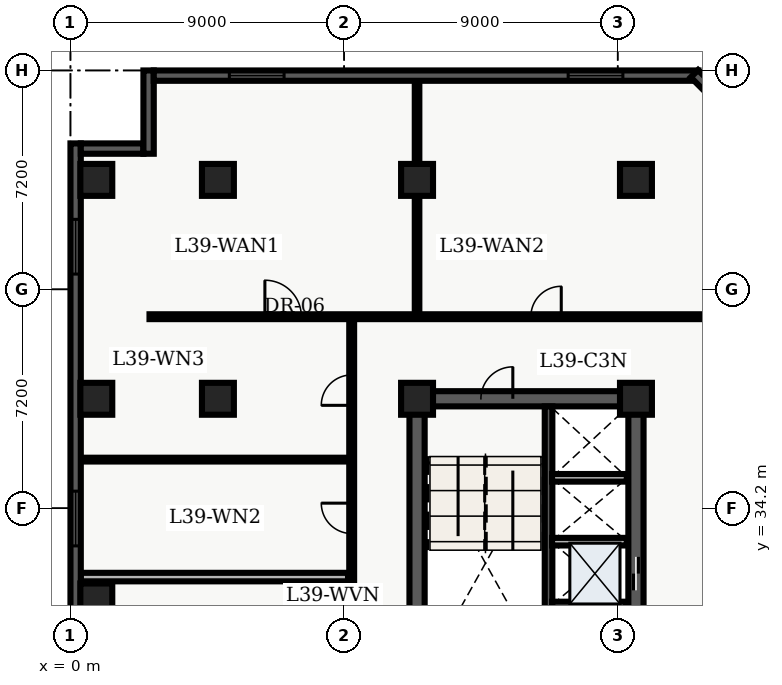
"""IFC4 building model, lengths in metres.
Left out: names, types, materials, properties, quantities, classifications, styles, units other than length and angle.
Written with IfcOpenShell. Run it as: python <this file> out.ifc"""

import sys

from ifc_helpers import new_model, entity, si_unit, converted_unit, direction, frame, origin_with_axes, origin_2d_with_axis, place, context, subcontext, project, spatial, polyline, rectangle, outline, extrude, element, fill, save


model = new_model("IFC4")
c1 = context("Model", 3, precision=1e-05, world=origin_with_axes(), true_north=direction((0.0, 1.0)))
c2 = subcontext(c1, "Body", "Model", "MODEL_VIEW")
j1 = project(units=[si_unit("LENGTHUNIT", "METRE"), converted_unit("PLANEANGLEUNIT", "DEGREE", entity("IfcPlaneAngleMeasure", 0.017), si_unit("PLANEANGLEUNIT", "RADIAN"), dimensions=[0, 0, 0, 0, 0, 0, 0])], contexts=[c1])
p1 = place(None, origin_with_axes())
s1 = spatial("IfcSite", under=j1, at=p1, CompositionType="ELEMENT")
p2 = place(p1, origin_with_axes())
s2 = spatial("IfcBuilding", under=s1, at=p2, CompositionType="ELEMENT")
p3 = place(p2, frame((0.0, 0.0, 160.2), z_axis=(0.0, 0.0, 1.0), x_axis=(1.0, 0.0, 0.0)))
s3 = spatial("IfcBuildingStorey", under=s2, at=p3, CompositionType="ELEMENT", Elevation=160.2)
p4 = place(p3, frame((11.4, 10.8, 0.0), z_axis=(0.0, 0.0, 1.0), x_axis=(0.0, 1.0, 0.0)))
e1 = element("IfcWall", 1, at=p4, inside=s3, PredefinedType="SHEAR", context=c2, shape_type="SweptSolid", body=[
    extrude(outline(polyline([(0.0, -0.25), (27.0, -0.25), (27.0, 0.25), (0.0, 0.25), (0.0, -0.25)])), origin_with_axes(), (0.0, 0.0, 1.0), 3.66),
])
p5 = place(p3, frame((11.4, 37.8, 0.0), z_axis=(0.0, 0.0, 1.0), x_axis=(1.0, 0.0, 0.0)))
e2 = element("IfcWall", 2, at=p5, inside=s3, PredefinedType="SHEAR", context=c2, shape_type="SweptSolid", body=[
    extrude(outline(polyline([(0.0, -0.25), (7.2, -0.25), (7.2, 0.25), (0.0, 0.25), (0.0, -0.25)])), origin_with_axes(), (0.0, 0.0, 1.0), 3.66),
])
p6 = place(p5, frame((2.625, 0.0, 0.0), z_axis=(0.0, 0.0, 1.0), x_axis=(1.0, 0.0, 0.0)))
e3 = element("IfcOpeningElement", 3, at=p6, cuts=e2, PredefinedType="OPENING", context=c2, shape_type="SweptSolid", body=[
    extrude(rectangle(XDim=1.05, YDim=0.52, at=origin_2d_with_axis()), origin_with_axes(), (0.0, 0.0, 1.0), 2.15),
])
p7 = place(p3, frame((18.6, 24.3, 0.0), z_axis=(0.0, 0.0, 1.0), x_axis=(0.0, 1.0, 0.0)))
e4 = element("IfcWall", 4, at=p7, inside=s3, PredefinedType="SHEAR", context=c2, shape_type="SweptSolid", body=[
    extrude(outline(polyline([(0.0, -0.25), (13.5, -0.25), (13.5, 0.25), (0.0, 0.25), (0.0, -0.25)])), origin_with_axes(), (0.0, 0.0, 1.0), 3.66),
])
p8 = place(p7, frame((5.65, 0.0, 0.0), z_axis=(0.0, 0.0, 1.0), x_axis=(1.0, 0.0, 0.0)))
e5 = element("IfcOpeningElement", 5, at=p8, cuts=e4, PredefinedType="OPENING", context=c2, shape_type="SweptSolid", body=[
    extrude(rectangle(XDim=1.1, YDim=0.52, at=origin_2d_with_axis()), origin_with_axes(), (0.0, 0.0, 1.0), 2.15),
])
p9 = place(p7, frame((7.75, 0.0, 0.0), z_axis=(0.0, 0.0, 1.0), x_axis=(1.0, 0.0, 0.0)))
e6 = element("IfcOpeningElement", 6, at=p9, cuts=e4, PredefinedType="OPENING", context=c2, shape_type="SweptSolid", body=[
    extrude(rectangle(XDim=1.1, YDim=0.52, at=origin_2d_with_axis()), origin_with_axes(), (0.0, 0.0, 1.0), 2.15),
])
p10 = place(p3, frame((15.725, 28.9, 0.0), z_axis=(0.0, 0.0, 1.0), x_axis=(0.0, 1.0, 0.0)))
e7 = element("IfcWall", 7, at=p10, inside=s3, PredefinedType="SHEAR", context=c2, shape_type="SweptSolid", body=[
    extrude(outline(polyline([(0.0, -0.125), (8.65, -0.125), (8.65, 0.125), (0.0, 0.125), (0.0, -0.125)])), origin_with_axes(), (0.0, 0.0, 1.0), 3.66),
])
for number, where, z_axis, x_axis in (
    (8, (11.4, 37.8, 0.0), (0.0, 0.0, 1.0), (1.0, 0.0, 0.0)),
    (9, (11.4, 45.0, 0.0), (0.0, 0.0, 1.0), (1.0, 0.0, 0.0)),
    (10, (18.6, 37.8, 0.0), (0.0, 0.0, 1.0), (1.0, 0.0, 0.0)),
    (11, (18.6, 45.0, 0.0), (0.0, 0.0, 1.0), (1.0, 0.0, 0.0)),
    (12, (4.85, 37.8, 0.0), (0.0, 0.0, 1.0), (1.0, 0.0, 0.0)),
    (13, (4.85, 45.0, 0.0), (0.0, 0.0, 1.0), (1.0, 0.0, 0.0)),
    (14, (0.85, 31.2, 0.0), (0.0, 0.0, 1.0), (1.0, 0.0, 0.0)),
    (15, (0.85, 37.8, 0.0), (0.0, 0.0, 1.0), (1.0, 0.0, 0.0)),
    (16, (0.85, 45.0, 0.0), (0.0, 0.0, 1.0), (1.0, 0.0, 0.0)),
):
    element("IfcColumn", number, at=place(p3, frame(where, z_axis=z_axis, x_axis=x_axis)), inside=s3, PredefinedType="COLUMN", context=c2, shape_type="SweptSolid", body=[
        extrude(rectangle(XDim=1.05, YDim=1.05, at=origin_2d_with_axis()), origin_with_axes(), (0.0, 0.0, 1.0), 3.9),
    ])
for number, where, z_axis, x_axis in (
    (17, (15.84, 31.0, 0.0), (0.0, 0.0, 1.0), (1.0, 0.0, 0.0)),
    (18, (15.84, 33.1, 0.0), (0.0, 0.0, 1.0), (1.0, 0.0, 0.0)),
    (19, (15.84, 35.2, 0.0), (0.0, 0.0, 1.0), (1.0, 0.0, 0.0)),
):
    element("IfcWall", number, at=place(p3, frame(where, z_axis=z_axis, x_axis=x_axis)), inside=s3, PredefinedType="SOLIDWALL", context=c2, shape_type="SweptSolid", body=[
        extrude(outline(polyline([(0.0, -0.125), (2.46, -0.125), (2.46, 0.125), (0.0, 0.125), (0.0, -0.125)])), origin_with_axes(), (0.0, 0.0, 1.0), 2.7),
    ])
p11 = place(p3, frame((2.6, 40.5, 0.0), z_axis=(0.0, 0.0, 1.0), x_axis=(1.0, 0.0, 0.0)))
e20 = element("IfcWall", 20, at=p11, inside=s3, PredefinedType="PARTITIONING", context=c2, shape_type="SweptSolid", body=[
    extrude(outline(polyline([(0.0, -0.08), (20.481, -0.08), (20.481, 0.08), (0.0, 0.08), (0.0, -0.08)])), origin_with_axes(), (0.0, 0.0, 1.0), 2.7),
])
p12 = place(p11, frame((4.395, 0.0, 0.0), z_axis=(0.0, 0.0, 1.0), x_axis=(1.0, 0.0, 0.0)))
e21 = element("IfcOpeningElement", 21, at=p12, cuts=e20, PredefinedType="OPENING", context=c2, shape_type="SweptSolid", body=[
    extrude(rectangle(XDim=1.2, YDim=0.18, at=origin_2d_with_axis()), origin_with_axes(), (0.0, 0.0, 1.0), 2.2),
])
p13 = place(p11, frame((13.043, 0.0, 0.0), z_axis=(0.0, 0.0, 1.0), x_axis=(1.0, 0.0, 0.0)))
e22 = element("IfcOpeningElement", 22, at=p13, cuts=e20, PredefinedType="OPENING", context=c2, shape_type="SweptSolid", body=[
    extrude(rectangle(XDim=1.0, YDim=0.18, at=origin_2d_with_axis()), origin_with_axes(), (0.0, 0.0, 1.0), 2.15),
])
p14 = place(p3, frame((9.25, 24.4, 0.0), z_axis=(0.0, 0.0, 1.0), x_axis=(0.0, 1.0, 0.0)))
e23 = element("IfcWall", 23, at=p14, inside=s3, PredefinedType="PARTITIONING", context=c2, shape_type="SweptSolid", body=[
    extrude(outline(polyline([(0.0, -0.08), (16.1, -0.08), (16.1, 0.08), (0.0, 0.08), (0.0, -0.08)])), origin_with_axes(), (0.0, 0.0, 1.0), 2.7),
])
p15 = place(p14, frame((3.808, 0.0, 0.0), z_axis=(0.0, 0.0, 1.0), x_axis=(1.0, 0.0, 0.0)))
e24 = element("IfcOpeningElement", 24, at=p15, cuts=e23, PredefinedType="OPENING", context=c2, shape_type="SweptSolid", body=[
    extrude(rectangle(XDim=1.0, YDim=0.18, at=origin_2d_with_axis()), origin_with_axes(), (0.0, 0.0, 1.0), 2.15),
])
p16 = place(p14, frame((9.467, 0.0, 0.0), z_axis=(0.0, 0.0, 1.0), x_axis=(1.0, 0.0, 0.0)))
e25 = element("IfcOpeningElement", 25, at=p16, cuts=e23, PredefinedType="OPENING", context=c2, shape_type="SweptSolid", body=[
    extrude(rectangle(XDim=1.0, YDim=0.18, at=origin_2d_with_axis()), origin_with_axes(), (0.0, 0.0, 1.0), 2.15),
])
p17 = place(p14, frame((13.684, 0.0, 0.0), z_axis=(0.0, 0.0, 1.0), x_axis=(1.0, 0.0, 0.0)))
e26 = element("IfcOpeningElement", 26, at=p17, cuts=e23, PredefinedType="OPENING", context=c2, shape_type="SweptSolid", body=[
    extrude(rectangle(XDim=1.0, YDim=0.18, at=origin_2d_with_axis()), origin_with_axes(), (0.0, 0.0, 1.0), 2.15),
])
p18 = place(p3, frame((0.335, 31.935, 0.0), z_axis=(0.0, 0.0, 1.0), x_axis=(1.0, 0.0, 0.0)))
e27 = element("IfcWall", 27, at=p18, inside=s3, PredefinedType="PARTITIONING", context=c2, shape_type="SweptSolid", body=[
    extrude(outline(polyline([(0.0, -0.14), (8.795, -0.14), (8.795, 0.14), (0.0, 0.14), (0.0, -0.14)])), origin_with_axes(), (0.0, 0.0, 1.0), 2.7),
])
p19 = place(p3, frame((0.335, 35.799, 0.0), z_axis=(0.0, 0.0, 1.0), x_axis=(1.0, 0.0, 0.0)))
e28 = element("IfcWall", 28, at=p19, inside=s3, PredefinedType="PARTITIONING", context=c2, shape_type="SweptSolid", body=[
    extrude(outline(polyline([(0.0, -0.062), (8.795, -0.062), (8.795, 0.062), (0.0, 0.062), (0.0, -0.062)])), origin_with_axes(), (0.0, 0.0, 1.0), 2.7),
])
p20 = place(p3, frame((11.4, 40.6, 0.0), z_axis=(0.0, 0.0, 1.0), x_axis=(0.0, 1.0, 0.0)))
e29 = element("IfcWall", 29, at=p20, inside=s3, PredefinedType="PARTITIONING", context=c2, shape_type="SweptSolid", body=[
    extrude(outline(polyline([(0.0, -0.075), (7.665, -0.075), (7.665, 0.075), (0.0, 0.075), (0.0, -0.075)])), origin_with_axes(), (0.0, 0.0, 1.0), 2.7),
])
p21 = place(p3, frame((0.17, 2.74, 0.0), z_axis=(0.0, 0.0, 1.0), x_axis=(0.0, 1.0, 0.0)))
e30 = element("IfcWall", 30, at=p21, inside=s3, PredefinedType="SOLIDWALL", context=c2, shape_type="SweptSolid", body=[
    extrude(outline(polyline([(0.0, -0.17), (43.46, -0.17), (43.46, 0.17), (0.0, 0.17), (0.0, -0.17)])), origin_with_axes(), (0.0, 0.0, 1.0), 3.66),
])
p22 = place(p21, frame((2.948, 0.0, 0.45), z_axis=(0.0, 0.0, 1.0), x_axis=(1.0, 0.0, 0.0)))
e31 = element("IfcOpeningElement", 31, at=p22, cuts=e30, PredefinedType="OPENING", context=c2, shape_type="SweptSolid", body=[
    extrude(rectangle(XDim=1.8, YDim=0.36, at=origin_2d_with_axis()), origin_with_axes(), (0.0, 0.0, 1.0), 2.1),
])
p23 = place(p21, frame((12.339, 0.0, 0.45), z_axis=(0.0, 0.0, 1.0), x_axis=(1.0, 0.0, 0.0)))
e32 = element("IfcOpeningElement", 32, at=p23, cuts=e30, PredefinedType="OPENING", context=c2, shape_type="SweptSolid", body=[
    extrude(rectangle(XDim=1.8, YDim=0.36, at=origin_2d_with_axis()), origin_with_axes(), (0.0, 0.0, 1.0), 2.1),
])
p24 = place(p21, frame((26.426, 0.0, 0.45), z_axis=(0.0, 0.0, 1.0), x_axis=(1.0, 0.0, 0.0)))
e33 = element("IfcOpeningElement", 33, at=p24, cuts=e30, PredefinedType="OPENING", context=c2, shape_type="SweptSolid", body=[
    extrude(rectangle(XDim=1.8, YDim=0.36, at=origin_2d_with_axis()), origin_with_axes(), (0.0, 0.0, 1.0), 2.1),
])
p25 = place(p21, frame((31.121, 0.0, 0.45), z_axis=(0.0, 0.0, 1.0), x_axis=(1.0, 0.0, 0.0)))
e34 = element("IfcOpeningElement", 34, at=p25, cuts=e30, PredefinedType="OPENING", context=c2, shape_type="SweptSolid", body=[
    extrude(rectangle(XDim=1.8, YDim=0.36, at=origin_2d_with_axis()), origin_with_axes(), (0.0, 0.0, 1.0), 2.1),
])
p26 = place(p21, frame((40.062, 0.0, 0.45), z_axis=(0.0, 0.0, 1.0), x_axis=(1.0, 0.0, 0.0)))
e35 = element("IfcOpeningElement", 35, at=p26, cuts=e30, PredefinedType="OPENING", context=c2, shape_type="SweptSolid", body=[
    extrude(rectangle(XDim=1.8, YDim=0.36, at=origin_2d_with_axis()), origin_with_axes(), (0.0, 0.0, 1.0), 2.1),
])
p27 = place(p3, frame((0.34, 46.03, 0.0), z_axis=(0.0, 0.0, 1.0), x_axis=(1.0, 0.0, 0.0)))
e36 = element("IfcWall", 36, at=p27, inside=s3, PredefinedType="SOLIDWALL", context=c2, shape_type="SweptSolid", body=[
    extrude(outline(polyline([(0.0, -0.17), (2.06, -0.17), (2.06, 0.17), (0.0, 0.17), (0.0, -0.17)])), origin_with_axes(), (0.0, 0.0, 1.0), 3.66),
])
p28 = place(p3, frame((2.57, 45.86, 0.0), z_axis=(0.0, 0.0, 1.0), x_axis=(0.0, 1.0, 0.0)))
e37 = element("IfcWall", 37, at=p28, inside=s3, PredefinedType="SOLIDWALL", context=c2, shape_type="SweptSolid", body=[
    extrude(outline(polyline([(0.0, -0.17), (2.74, -0.17), (2.74, 0.17), (0.0, 0.17), (0.0, -0.17)])), origin_with_axes(), (0.0, 0.0, 1.0), 3.66),
])
p29 = place(p3, frame((2.74, 48.43, 0.0), z_axis=(0.0, 0.0, 1.0), x_axis=(1.0, 0.0, 0.0)))
e38 = element("IfcWall", 38, at=p29, inside=s3, PredefinedType="SOLIDWALL", context=c2, shape_type="SweptSolid", body=[
    extrude(outline(polyline([(0.0, -0.17), (17.916, -0.17), (17.916, 0.17), (0.0, 0.17), (0.0, -0.17)])), origin_with_axes(), (0.0, 0.0, 1.0), 3.66),
])
p30 = place(p29, frame((3.386, 0.0, 0.45), z_axis=(0.0, 0.0, 1.0), x_axis=(1.0, 0.0, 0.0)))
e39 = element("IfcOpeningElement", 39, at=p30, cuts=e38, PredefinedType="OPENING", context=c2, shape_type="SweptSolid", body=[
    extrude(rectangle(XDim=1.8, YDim=0.36, at=origin_2d_with_axis()), origin_with_axes(), (0.0, 0.0, 1.0), 2.1),
])
p31 = place(p29, frame((14.53, 0.0, 0.45), z_axis=(0.0, 0.0, 1.0), x_axis=(1.0, 0.0, 0.0)))
e40 = element("IfcOpeningElement", 40, at=p31, cuts=e38, PredefinedType="OPENING", context=c2, shape_type="SweptSolid", body=[
    extrude(rectangle(XDim=1.8, YDim=0.36, at=origin_2d_with_axis()), origin_with_axes(), (0.0, 0.0, 1.0), 2.1),
])
p32 = place(p3, frame((20.522, 48.494, 0.0), z_axis=(0.0, 0.0, 1.0), x_axis=(0.707107, -0.707107, 0.0)))
e41 = element("IfcWall", 41, at=p32, inside=s3, PredefinedType="SOLIDWALL", context=c2, shape_type="SweptSolid", body=[
    extrude(outline(polyline([(0.0, -0.17), (3.923, -0.17), (3.923, 0.17), (0.0, 0.17), (0.0, -0.17)])), origin_with_axes(), (0.0, 0.0, 1.0), 3.66),
])
p33 = place(p7, frame((7.75, 0.0, 0.0), z_axis=(0.0, 0.0, 1.0), x_axis=(1.0, 0.0, 0.0)))
e42 = element("IfcDoor", 42, at=p33, inside=s3, OperationType="SLIDING_TO_RIGHT", PredefinedType="DOOR", context=c2, shape_type="SweptSolid", body=[
    extrude(rectangle(XDim=1.1, YDim=0.09, at=origin_2d_with_axis()), origin_with_axes(), (0.0, 0.0, 1.0), 2.15),
])
fill(e6, e42)
p34 = place(p5, frame((2.625, 0.0, 0.0), z_axis=(0.0, 0.0, 1.0), x_axis=(1.0, 0.0, 0.0)))
e43 = element("IfcDoor", 43, at=p34, inside=s3, OperationType="SINGLE_SWING_RIGHT", PredefinedType="DOOR", context=c2, shape_type="SweptSolid", body=[
    extrude(rectangle(XDim=1.05, YDim=0.09, at=origin_2d_with_axis()), origin_with_axes(), (0.0, 0.0, 1.0), 2.15),
])
fill(e3, e43)
p35 = place(p14, frame((9.467, 0.0, 0.0), z_axis=(0.0, 0.0, 1.0), x_axis=(1.0, 0.0, 0.0)))
e44 = element("IfcDoor", 44, at=p35, inside=s3, OperationType="SINGLE_SWING_RIGHT", PredefinedType="DOOR", context=c2, shape_type="SweptSolid", body=[
    extrude(rectangle(XDim=1.0, YDim=0.09, at=origin_2d_with_axis()), origin_with_axes(), (0.0, 0.0, 1.0), 2.15),
])
fill(e25, e44)
p36 = place(p14, frame((13.684, 0.0, 0.0), z_axis=(0.0, 0.0, 1.0), x_axis=(1.0, 0.0, 0.0)))
e45 = element("IfcDoor", 45, at=p36, inside=s3, OperationType="SINGLE_SWING_LEFT", PredefinedType="DOOR", context=c2, shape_type="SweptSolid", body=[
    extrude(rectangle(XDim=1.0, YDim=0.09, at=origin_2d_with_axis()), origin_with_axes(), (0.0, 0.0, 1.0), 2.15),
])
fill(e26, e45)
p37 = place(p11, frame((4.395, 0.0, 0.0), z_axis=(0.0, 0.0, 1.0), x_axis=(1.0, 0.0, 0.0)))
e46 = element("IfcDoor", 46, at=p37, inside=s3, OperationType="SINGLE_SWING_LEFT", PredefinedType="DOOR", context=c2, shape_type="SweptSolid", body=[
    extrude(rectangle(XDim=1.2, YDim=0.09, at=origin_2d_with_axis()), origin_with_axes(), (0.0, 0.0, 1.0), 2.2),
])
fill(e21, e46)
p38 = place(p11, frame((13.043, 0.0, 0.0), z_axis=(0.0, 0.0, 1.0), x_axis=(1.0, 0.0, 0.0)))
e47 = element("IfcDoor", 47, at=p38, inside=s3, OperationType="SINGLE_SWING_RIGHT", PredefinedType="DOOR", context=c2, shape_type="SweptSolid", body=[
    extrude(rectangle(XDim=1.0, YDim=0.09, at=origin_2d_with_axis()), origin_with_axes(), (0.0, 0.0, 1.0), 2.15),
])
fill(e22, e47)
p39 = place(p21, frame((31.121, 0.0, 0.45), z_axis=(0.0, 0.0, 1.0), x_axis=(1.0, 0.0, 0.0)))
e48 = element("IfcWindow", 48, at=p39, inside=s3, PredefinedType="WINDOW", context=c2, shape_type="SweptSolid", body=[
    extrude(rectangle(XDim=1.8, YDim=0.09, at=origin_2d_with_axis()), origin_with_axes(), (0.0, 0.0, 1.0), 2.1),
])
fill(e34, e48)
p40 = place(p21, frame((40.062, 0.0, 0.45), z_axis=(0.0, 0.0, 1.0), x_axis=(1.0, 0.0, 0.0)))
e49 = element("IfcWindow", 49, at=p40, inside=s3, PredefinedType="WINDOW", context=c2, shape_type="SweptSolid", body=[
    extrude(rectangle(XDim=1.8, YDim=0.09, at=origin_2d_with_axis()), origin_with_axes(), (0.0, 0.0, 1.0), 2.1),
])
fill(e35, e49)
p41 = place(p29, frame((3.386, 0.0, 0.45), z_axis=(0.0, 0.0, 1.0), x_axis=(1.0, 0.0, 0.0)))
e50 = element("IfcWindow", 50, at=p41, inside=s3, PredefinedType="WINDOW", context=c2, shape_type="SweptSolid", body=[
    extrude(rectangle(XDim=1.8, YDim=0.09, at=origin_2d_with_axis()), origin_with_axes(), (0.0, 0.0, 1.0), 2.1),
])
fill(e39, e50)
p42 = place(p29, frame((14.53, 0.0, 0.45), z_axis=(0.0, 0.0, 1.0), x_axis=(1.0, 0.0, 0.0)))
e51 = element("IfcWindow", 51, at=p42, inside=s3, PredefinedType="WINDOW", context=c2, shape_type="SweptSolid", body=[
    extrude(rectangle(XDim=1.8, YDim=0.09, at=origin_2d_with_axis()), origin_with_axes(), (0.0, 0.0, 1.0), 2.1),
])
fill(e40, e51)
save(model, sys.argv[1])
